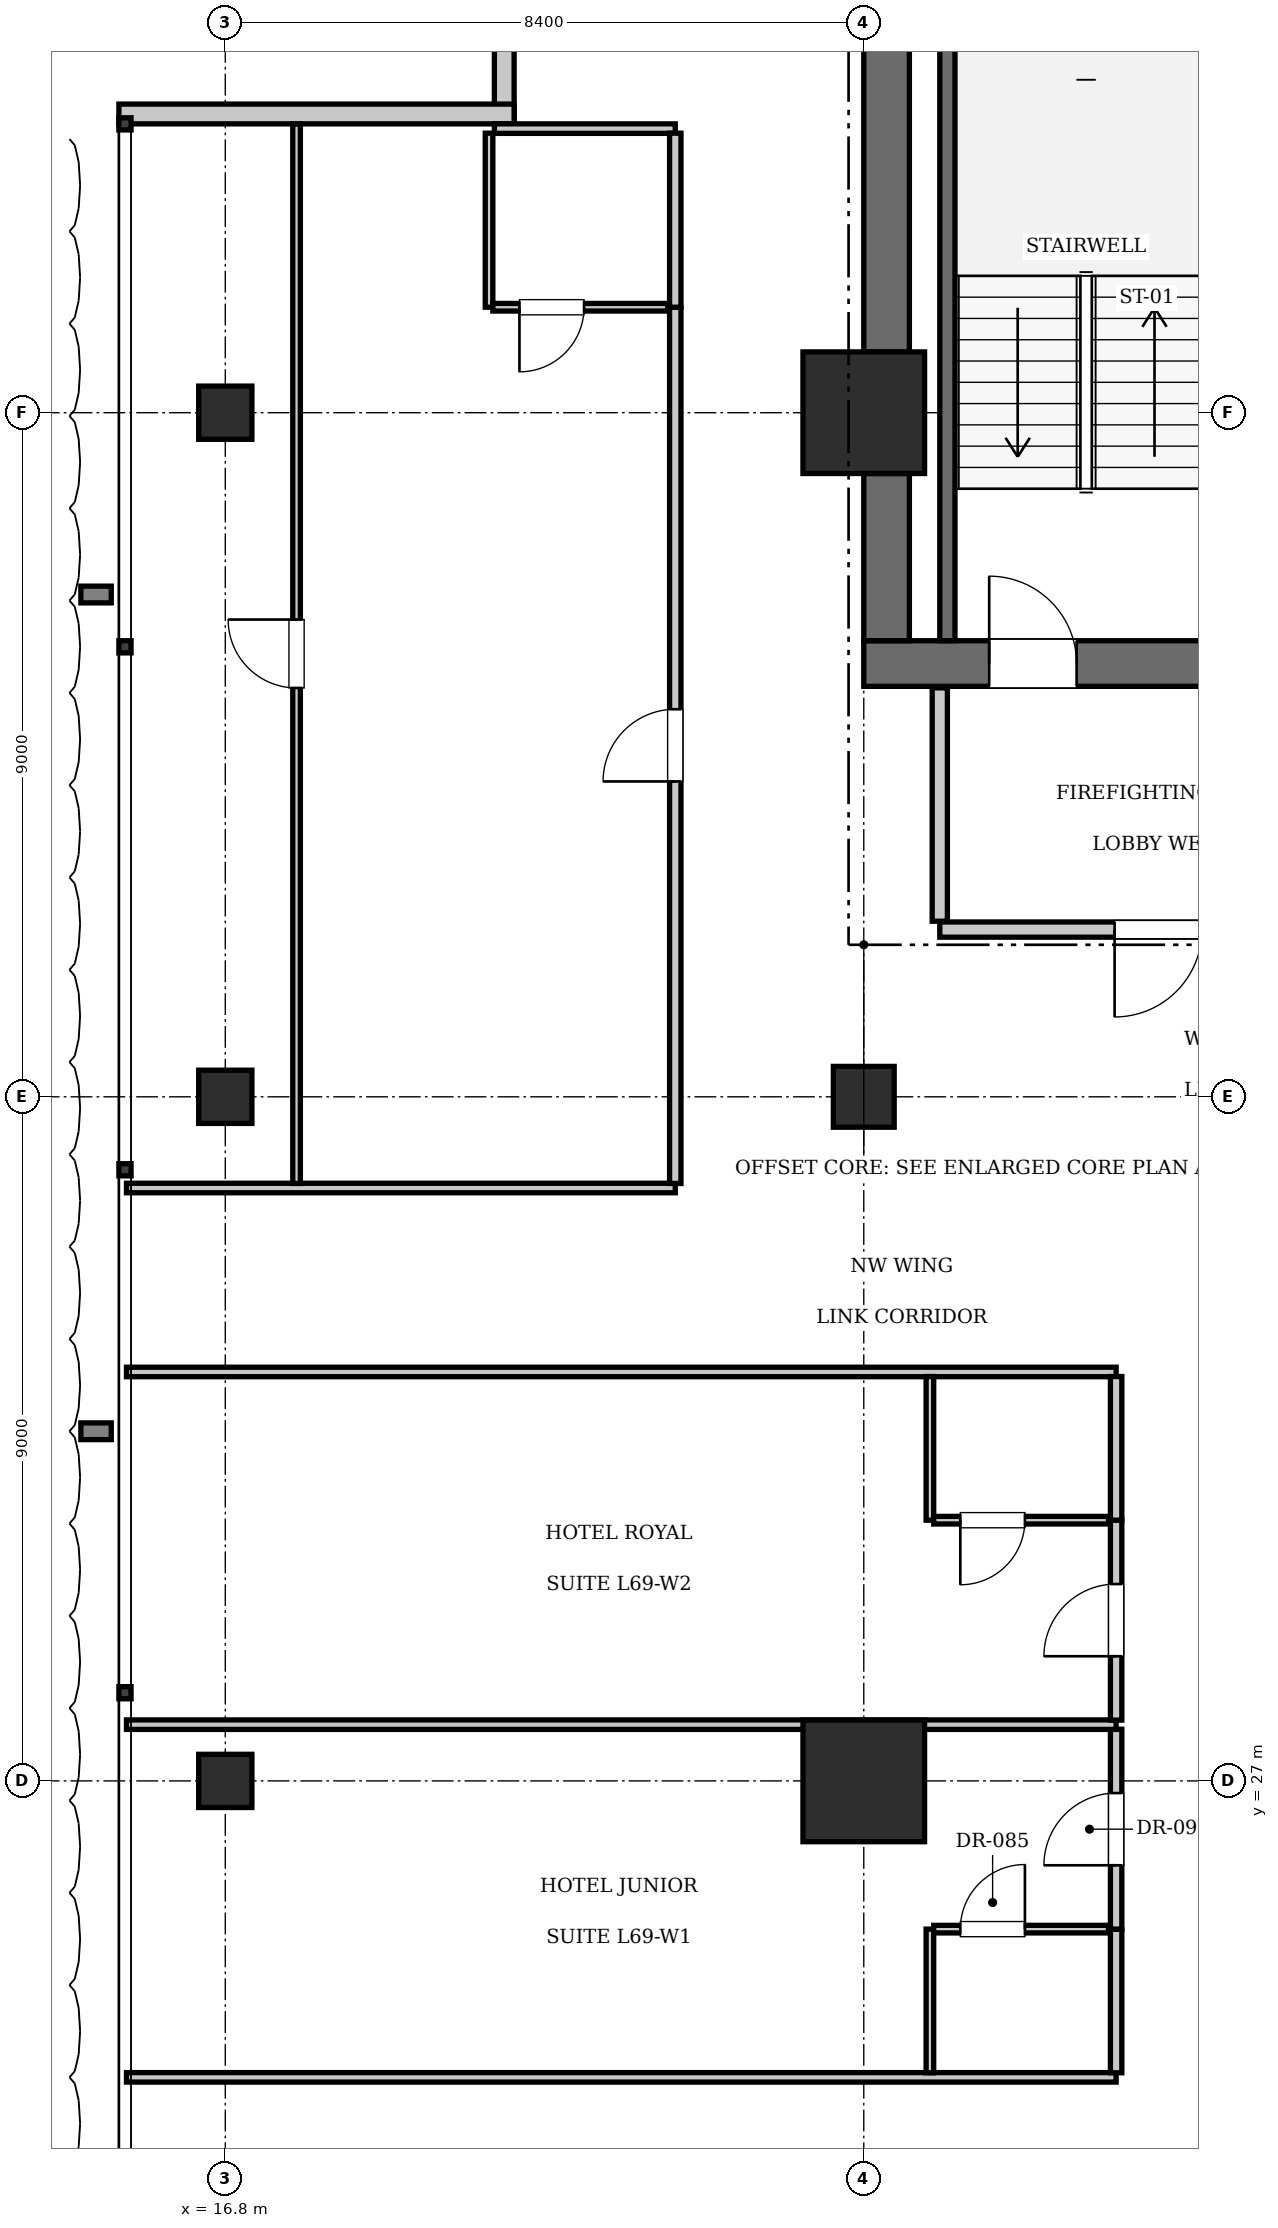
"""IFC4 building model, lengths in metres.
Left out: names, types, materials, properties, quantities, classifications, styles, units other than length and angle.
Written with IfcOpenShell. Run it as: python <this file> out.ifc"""

import sys

from ifc_helpers import new_model, si_unit, direction, frame, frame_2d, origin, origin_2d, place, context, subcontext, project, spatial, rectangle, extrude, element, fill, save


model = new_model("IFC4")
c1 = context("Model", 3, precision=1e-05, world=origin(), true_north=direction((0.0, 1.0)))
c2 = subcontext(c1, "Body", "Model", "MODEL_VIEW")
j1 = project(units=[si_unit("LENGTHUNIT", "METRE"), si_unit("PLANEANGLEUNIT", "RADIAN")], contexts=[c1])
p1 = place(None, origin())
s1 = spatial("IfcSite", under=j1, at=p1, CompositionType="ELEMENT")
p2 = place(p1, origin())
s2 = spatial("IfcBuilding", under=s1, at=p2, CompositionType="ELEMENT")
p3 = place(p2, frame((0.0, 0.0, 281.75)))
s3 = spatial("IfcBuildingStorey", under=s2, at=p3, CompositionType="ELEMENT", Elevation=281.75)
for number, where, z_axis, x_axis in (
    (1, (25.2, 27.0, 0.0), (0.0, 0.0, 1.0), (1.0, 0.0, 0.0)),
    (2, (25.2, 45.0, 0.0), (0.0, 0.0, 1.0), (1.0, 0.0, 0.0)),
):
    element("IfcColumn", number, at=place(p3, frame(where, z_axis=z_axis, x_axis=x_axis)), inside=s3, PredefinedType="COLUMN", context=c2, shape_type="SweptSolid", body=[
        extrude(rectangle(XDim=1.6, YDim=1.6, at=origin_2d()), origin(), (0.0, 0.0, 1.0), 3.85),
    ])
p4 = place(p3, frame((25.2, 41.7, 0.0), z_axis=(0.0, 0.0, 1.0), x_axis=(1.0, 0.0, 0.0)))
e3 = element("IfcWall", 3, at=p4, inside=s3, PredefinedType="SHEAR", context=c2, shape_type="SweptSolid", body=[
    extrude(rectangle(XDim=6.8, YDim=0.6, at=frame_2d((3.4, 0.0))), origin(), (0.0, 0.0, 1.0), 3.85),
])
p5 = place(p4, frame((1.65, 0.0, 0.0)))
e4 = element("IfcOpeningElement", 4, at=p5, cuts=e3, PredefinedType="OPENING", context=c2, shape_type="SweptSolid", body=[
    extrude(rectangle(XDim=1.15, YDim=2.15, at=frame_2d((0.575, 1.075))), frame((0.0, 0.31, 0.0), z_axis=(0.0, -1.0, 0.0), x_axis=(1.0, 0.0, 0.0)), (0.0, 0.0, 1.0), 0.62),
])
p6 = place(p4, frame((5.15, 0.0, 0.0)))
e5 = element("IfcOpeningElement", 5, at=p6, cuts=e3, PredefinedType="OPENING", context=c2, shape_type="SweptSolid", body=[
    extrude(rectangle(XDim=1.1, YDim=2.2, at=frame_2d((0.55, 1.1))), frame((0.0, 0.31, 0.0), z_axis=(0.0, -1.0, 0.0), x_axis=(1.0, 0.0, 0.0)), (0.0, 0.0, 1.0), 0.62),
])
p7 = place(p3, frame((25.5, 42.0, 0.0), z_axis=(0.0, 0.0, 1.0), x_axis=(0.0, 1.0, 0.0)))
e6 = element("IfcWall", 6, at=p7, inside=s3, PredefinedType="SHEAR", context=c2, shape_type="SweptSolid", body=[
    extrude(rectangle(XDim=2.2, YDim=0.6, at=frame_2d((1.1, 0.0))), origin(), (0.0, 0.0, 1.0), 3.85),
])
p8 = place(p3, frame((25.5, 45.8, 0.0), z_axis=(0.0, 0.0, 1.0), x_axis=(0.0, 1.0, 0.0)))
e7 = element("IfcWall", 7, at=p8, inside=s3, PredefinedType="SHEAR", context=c2, shape_type="SweptSolid", body=[
    extrude(rectangle(XDim=7.6, YDim=0.6, at=frame_2d((3.8, 0.0))), origin(), (0.0, 0.0, 1.0), 3.85),
])
p9 = place(p3, frame((25.2, 36.0, 0.0), z_axis=(0.0, 0.0, 1.0), x_axis=(1.0, 0.0, 0.0)))
e8 = element("IfcColumn", 8, at=p9, inside=s3, PredefinedType="COLUMN", context=c2, shape_type="SweptSolid", body=[
    extrude(rectangle(XDim=0.8, YDim=0.8, at=origin_2d()), origin(), (0.0, 0.0, 1.0), 3.85),
])
for number, where, z_axis, x_axis in (
    (9, (16.8, 27.0, 0.0), (0.0, 0.0, 1.0), (1.0, 0.0, 0.0)),
    (10, (16.8, 36.0, 0.0), (0.0, 0.0, 1.0), (1.0, 0.0, 0.0)),
    (11, (16.8, 45.0, 0.0), (0.0, 0.0, 1.0), (1.0, 0.0, 0.0)),
):
    element("IfcColumn", number, at=place(p3, frame(where, z_axis=z_axis, x_axis=x_axis)), inside=s3, PredefinedType="COLUMN", context=c2, shape_type="SweptSolid", body=[
        extrude(rectangle(XDim=0.7, YDim=0.7, at=origin_2d()), origin(), (0.0, 0.0, 1.0), 3.85),
    ])
p10 = place(p3, frame((26.3, 42.0, 0.0), z_axis=(0.0, 0.0, 1.0), x_axis=(0.0, 1.0, 0.0)))
e12 = element("IfcWall", 12, at=p10, inside=s3, PredefinedType="SOLIDWALL", context=c2, shape_type="SweptSolid", body=[
    extrude(rectangle(XDim=9.12, YDim=0.2, at=frame_2d((4.56, 0.0))), origin(), (0.0, 0.0, 1.0), 3.61),
])
p11 = place(p3, frame((20.47, 48.8, 0.0), z_axis=(0.0, 0.0, 1.0), x_axis=(0.0, 1.0, 0.0)))
e13 = element("IfcWall", 13, at=p11, inside=s3, PredefinedType="SOLIDWALL", context=c2, shape_type="SweptSolid", body=[
    extrude(rectangle(XDim=5.2, YDim=0.26, at=frame_2d((2.6, 0.0))), origin(), (0.0, 0.0, 1.0), 3.61),
])
p12 = place(p3, frame((15.4, 48.93, 0.0), z_axis=(0.0, 0.0, 1.0), x_axis=(1.0, 0.0, 0.0)))
e14 = element("IfcWall", 14, at=p12, inside=s3, PredefinedType="SOLIDWALL", context=c2, shape_type="SweptSolid", body=[
    extrude(rectangle(XDim=5.2, YDim=0.26, at=frame_2d((2.6, 0.0))), origin(), (0.0, 0.0, 1.0), 3.61),
])
p13 = place(p3, frame((26.2, 38.2, 0.0), z_axis=(0.0, 0.0, 1.0), x_axis=(1.0, 0.0, 0.0)))
e15 = element("IfcWall", 15, at=p13, inside=s3, PredefinedType="PARTITIONING", context=c2, shape_type="SweptSolid", body=[
    extrude(rectangle(XDim=5.8, YDim=0.2, at=frame_2d((2.9, 0.0))), origin(), (0.0, 0.0, 1.0), 3.61),
])
p14 = place(p13, frame((2.3, 0.0, 0.0)))
e16 = element("IfcOpeningElement", 16, at=p14, cuts=e15, PredefinedType="OPENING", context=c2, shape_type="SweptSolid", body=[
    extrude(rectangle(XDim=1.15, YDim=2.15, at=frame_2d((0.575, 1.075))), frame((0.0, 0.11, 0.0), z_axis=(0.0, -1.0, 0.0), x_axis=(1.0, 0.0, 0.0)), (0.0, 0.0, 1.0), 0.22),
])
p15 = place(p3, frame((26.2, 38.31, 0.0), z_axis=(0.0, 0.0, 1.0), x_axis=(0.0, 1.0, 0.0)))
e17 = element("IfcWall", 17, at=p15, inside=s3, PredefinedType="PARTITIONING", context=c2, shape_type="SweptSolid", body=[
    extrude(rectangle(XDim=3.07, YDim=0.2, at=frame_2d((1.535, 0.0))), origin(), (0.0, 0.0, 1.0), 3.61),
])
for number, where, z_axis, x_axis in (
    (18, (15.5, 23.1, 0.0), (0.0, 0.0, 1.0), (1.0, 0.0, 0.0)),
    (19, (15.5, 32.38, 0.0), (0.0, 0.0, 1.0), (1.0, 0.0, 0.0)),
):
    element("IfcWall", number, at=place(p3, frame(where, z_axis=z_axis, x_axis=x_axis)), inside=s3, PredefinedType="PARTITIONING", context=c2, shape_type="SweptSolid", body=[
        extrude(rectangle(XDim=13.02, YDim=0.125, at=frame_2d((6.51, 0.0))), origin(), (0.0, 0.0, 1.0), 3.61),
    ])
p16 = place(p3, frame((28.52, 23.16, 0.0), z_axis=(0.0, 0.0, 1.0), x_axis=(0.0, 1.0, 0.0)))
e20 = element("IfcWall", 20, at=p16, inside=s3, PredefinedType="PARTITIONING", context=c2, shape_type="SweptSolid", body=[
    extrude(rectangle(XDim=1.89, YDim=0.15, at=frame_2d((0.945, 0.0))), origin(), (0.0, 0.0, 1.0), 3.61),
])
p17 = place(p3, frame((28.52, 25.05, 0.0), z_axis=(0.0, 0.0, 1.0), x_axis=(0.0, 1.0, 0.0)))
e21 = element("IfcWall", 21, at=p17, inside=s3, PredefinedType="PARTITIONING", context=c2, shape_type="SweptSolid", body=[
    extrude(rectangle(XDim=2.63, YDim=0.15, at=frame_2d((1.315, 0.0))), origin(), (0.0, 0.0, 1.0), 3.61),
])
p18 = place(p17, frame((0.84, 0.0, 0.0)))
e22 = element("IfcOpeningElement", 22, at=p18, cuts=e21, PredefinedType="OPENING", context=c2, shape_type="SweptSolid", body=[
    extrude(rectangle(XDim=0.95, YDim=2.15, at=frame_2d((0.475, 1.075))), frame((0.0, 0.085, 0.0), z_axis=(0.0, -1.0, 0.0), x_axis=(1.0, 0.0, 0.0)), (0.0, 0.0, 1.0), 0.17),
])
p19 = place(p3, frame((26.07, 23.16, 0.0), z_axis=(0.0, 0.0, 1.0), x_axis=(0.0, 1.0, 0.0)))
e23 = element("IfcWall", 23, at=p19, inside=s3, PredefinedType="PARTITIONING", context=c2, shape_type="SweptSolid", body=[
    extrude(rectangle(XDim=1.89, YDim=0.1, at=frame_2d((0.945, 0.0))), origin(), (0.0, 0.0, 1.0), 3.61),
])
p20 = place(p3, frame((26.12, 25.05, 0.0), z_axis=(0.0, 0.0, 1.0), x_axis=(1.0, 0.0, 0.0)))
e24 = element("IfcWall", 24, at=p20, inside=s3, PredefinedType="PARTITIONING", context=c2, shape_type="SweptSolid", body=[
    extrude(rectangle(XDim=2.3, YDim=0.1, at=frame_2d((1.15, 0.0))), origin(), (0.0, 0.0, 1.0), 3.61),
])
p21 = place(p20, frame((0.35, 0.0, 0.0)))
e25 = element("IfcOpeningElement", 25, at=p21, cuts=e24, PredefinedType="OPENING", context=c2, shape_type="SweptSolid", body=[
    extrude(rectangle(XDim=0.85, YDim=2.1, at=frame_2d((0.425, 1.05))), frame((0.0, 0.06, 0.0), z_axis=(0.0, -1.0, 0.0), x_axis=(1.0, 0.0, 0.0)), (0.0, 0.0, 1.0), 0.12),
])
p22 = place(p3, frame((15.5, 27.74, 0.0), z_axis=(0.0, 0.0, 1.0), x_axis=(1.0, 0.0, 0.0)))
e26 = element("IfcWall", 26, at=p22, inside=s3, PredefinedType="PARTITIONING", context=c2, shape_type="SweptSolid", body=[
    extrude(rectangle(XDim=13.02, YDim=0.125, at=frame_2d((6.51, 0.0))), origin(), (0.0, 0.0, 1.0), 3.61),
])
p23 = place(p3, frame((28.52, 27.8, 0.0), z_axis=(0.0, 0.0, 1.0), x_axis=(0.0, 1.0, 0.0)))
e27 = element("IfcWall", 27, at=p23, inside=s3, PredefinedType="PARTITIONING", context=c2, shape_type="SweptSolid", body=[
    extrude(rectangle(XDim=2.63, YDim=0.15, at=frame_2d((1.315, 0.0))), origin(), (0.0, 0.0, 1.0), 3.61),
])
p24 = place(p23, frame((0.84, 0.0, 0.0)))
e28 = element("IfcOpeningElement", 28, at=p24, cuts=e27, PredefinedType="OPENING", context=c2, shape_type="SweptSolid", body=[
    extrude(rectangle(XDim=0.95, YDim=2.15, at=frame_2d((0.475, 1.075))), frame((0.0, 0.085, 0.0), z_axis=(0.0, -1.0, 0.0), x_axis=(1.0, 0.0, 0.0)), (0.0, 0.0, 1.0), 0.17),
])
p25 = place(p3, frame((28.52, 30.43, 0.0), z_axis=(0.0, 0.0, 1.0), x_axis=(0.0, 1.0, 0.0)))
e29 = element("IfcWall", 29, at=p25, inside=s3, PredefinedType="PARTITIONING", context=c2, shape_type="SweptSolid", body=[
    extrude(rectangle(XDim=1.89, YDim=0.15, at=frame_2d((0.945, 0.0))), origin(), (0.0, 0.0, 1.0), 3.61),
])
p26 = place(p3, frame((26.07, 30.43, 0.0), z_axis=(0.0, 0.0, 1.0), x_axis=(0.0, 1.0, 0.0)))
e30 = element("IfcWall", 30, at=p26, inside=s3, PredefinedType="PARTITIONING", context=c2, shape_type="SweptSolid", body=[
    extrude(rectangle(XDim=1.89, YDim=0.1, at=frame_2d((0.945, 0.0))), origin(), (0.0, 0.0, 1.0), 3.61),
])
p27 = place(p3, frame((26.12, 30.43, 0.0), z_axis=(0.0, 0.0, 1.0), x_axis=(1.0, 0.0, 0.0)))
e31 = element("IfcWall", 31, at=p27, inside=s3, PredefinedType="PARTITIONING", context=c2, shape_type="SweptSolid", body=[
    extrude(rectangle(XDim=2.3, YDim=0.1, at=frame_2d((1.15, 0.0))), origin(), (0.0, 0.0, 1.0), 3.61),
])
p28 = place(p27, frame((0.35, 0.0, 0.0)))
e32 = element("IfcOpeningElement", 32, at=p28, cuts=e31, PredefinedType="OPENING", context=c2, shape_type="SweptSolid", body=[
    extrude(rectangle(XDim=0.85, YDim=2.1, at=frame_2d((0.425, 1.05))), frame((0.0, 0.06, 0.0), z_axis=(0.0, -1.0, 0.0), x_axis=(1.0, 0.0, 0.0)), (0.0, 0.0, 1.0), 0.12),
])
p29 = place(p3, frame((15.5, 34.8, 0.0), z_axis=(0.0, 0.0, 1.0), x_axis=(1.0, 0.0, 0.0)))
e33 = element("IfcWall", 33, at=p29, inside=s3, PredefinedType="PARTITIONING", context=c2, shape_type="SweptSolid", body=[
    extrude(rectangle(XDim=7.22, YDim=0.125, at=frame_2d((3.61, 0.0))), origin(), (0.0, 0.0, 1.0), 3.61),
])
p30 = place(p3, frame((20.34, 48.738, 0.0), z_axis=(0.0, 0.0, 1.0), x_axis=(1.0, 0.0, 0.0)))
e34 = element("IfcWall", 34, at=p30, inside=s3, PredefinedType="PARTITIONING", context=c2, shape_type="SweptSolid", body=[
    extrude(rectangle(XDim=2.38, YDim=0.125, at=frame_2d((1.19, 0.0))), origin(), (0.0, 0.0, 1.0), 3.61),
])
p31 = place(p3, frame((22.72, 34.86, 0.0), z_axis=(0.0, 0.0, 1.0), x_axis=(0.0, 1.0, 0.0)))
e35 = element("IfcWall", 35, at=p31, inside=s3, PredefinedType="PARTITIONING", context=c2, shape_type="SweptSolid", body=[
    extrude(rectangle(XDim=11.527, YDim=0.15, at=frame_2d((5.764, 0.0))), origin(), (0.0, 0.0, 1.0), 3.61),
])
p32 = place(p31, frame((5.289, 0.0, 0.0)))
e36 = element("IfcOpeningElement", 36, at=p32, cuts=e35, PredefinedType="OPENING", context=c2, shape_type="SweptSolid", body=[
    extrude(rectangle(XDim=0.95, YDim=2.15, at=frame_2d((0.475, 1.075))), frame((0.0, 0.085, 0.0), z_axis=(0.0, -1.0, 0.0), x_axis=(1.0, 0.0, 0.0)), (0.0, 0.0, 1.0), 0.17),
])
p33 = place(p3, frame((22.72, 46.387, 0.0), z_axis=(0.0, 0.0, 1.0), x_axis=(0.0, 1.0, 0.0)))
e37 = element("IfcWall", 37, at=p33, inside=s3, PredefinedType="PARTITIONING", context=c2, shape_type="SweptSolid", body=[
    extrude(rectangle(XDim=2.29, YDim=0.15, at=frame_2d((1.145, 0.0))), origin(), (0.0, 0.0, 1.0), 3.61),
])
p34 = place(p3, frame((20.27, 46.387, 0.0), z_axis=(0.0, 0.0, 1.0), x_axis=(0.0, 1.0, 0.0)))
e38 = element("IfcWall", 38, at=p34, inside=s3, PredefinedType="PARTITIONING", context=c2, shape_type="SweptSolid", body=[
    extrude(rectangle(XDim=2.29, YDim=0.1, at=frame_2d((1.145, 0.0))), origin(), (0.0, 0.0, 1.0), 3.61),
])
p35 = place(p3, frame((20.32, 46.387, 0.0), z_axis=(0.0, 0.0, 1.0), x_axis=(1.0, 0.0, 0.0)))
e39 = element("IfcWall", 39, at=p35, inside=s3, PredefinedType="PARTITIONING", context=c2, shape_type="SweptSolid", body=[
    extrude(rectangle(XDim=2.3, YDim=0.1, at=frame_2d((1.15, 0.0))), origin(), (0.0, 0.0, 1.0), 3.61),
])
p36 = place(p35, frame((0.35, 0.0, 0.0)))
e40 = element("IfcOpeningElement", 40, at=p36, cuts=e39, PredefinedType="OPENING", context=c2, shape_type="SweptSolid", body=[
    extrude(rectangle(XDim=0.85, YDim=2.1, at=frame_2d((0.425, 1.05))), frame((0.0, 0.06, 0.0), z_axis=(0.0, -1.0, 0.0), x_axis=(1.0, 0.0, 0.0)), (0.0, 0.0, 1.0), 0.12),
])
p37 = place(p3, frame((17.738, 34.86, 0.0), z_axis=(0.0, 0.0, 1.0), x_axis=(0.0, 1.0, 0.0)))
e41 = element("IfcWall", 41, at=p37, inside=s3, PredefinedType="PARTITIONING", context=c2, shape_type="SweptSolid", body=[
    extrude(rectangle(XDim=13.938, YDim=0.1, at=frame_2d((6.969, 0.0))), origin(), (0.0, 0.0, 1.0), 3.61),
])
p38 = place(p37, frame((6.519, 0.0, 0.0)))
e42 = element("IfcOpeningElement", 42, at=p38, cuts=e41, PredefinedType="OPENING", context=c2, shape_type="SweptSolid", body=[
    extrude(rectangle(XDim=0.9, YDim=2.1, at=frame_2d((0.45, 1.05))), frame((0.0, 0.06, 0.0), z_axis=(0.0, -1.0, 0.0), x_axis=(1.0, 0.0, 0.0)), (0.0, 0.0, 1.0), 0.12),
])
p39 = place(p5, origin())
e43 = element("IfcDoor", 43, at=p39, inside=s3, OperationType="SINGLE_SWING_LEFT", PredefinedType="DOOR", context=c2, shape_type="SweptSolid", body=[
    extrude(rectangle(XDim=1.15, YDim=2.15, at=frame_2d((0.575, 1.075))), frame((0.0, 0.025, 0.0), z_axis=(0.0, -1.0, 0.0), x_axis=(1.0, 0.0, 0.0)), (0.0, 0.0, 1.0), 0.05),
])
fill(e4, e43)
p40 = place(p14, frame((1.15, 0.0, 0.0), z_axis=(0.0, 0.0, 1.0), x_axis=(-1.0, 0.0, 0.0)))
e44 = element("IfcDoor", 44, at=p40, inside=s3, OperationType="SINGLE_SWING_RIGHT", PredefinedType="DOOR", context=c2, shape_type="SweptSolid", body=[
    extrude(rectangle(XDim=1.15, YDim=2.15, at=frame_2d((0.575, 1.075))), frame((0.0, 0.025, 0.0), z_axis=(0.0, -1.0, 0.0), x_axis=(1.0, 0.0, 0.0)), (0.0, 0.0, 1.0), 0.05),
])
fill(e16, e44)
p41 = place(p21, origin())
e45 = element("IfcDoor", 45, at=p41, inside=s3, OperationType="SINGLE_SWING_RIGHT", PredefinedType="DOOR", context=c2, shape_type="SweptSolid", body=[
    extrude(rectangle(XDim=0.85, YDim=2.1, at=frame_2d((0.425, 1.05))), frame((0.0, 0.025, 0.0), z_axis=(0.0, -1.0, 0.0), x_axis=(1.0, 0.0, 0.0)), (0.0, 0.0, 1.0), 0.05),
])
fill(e25, e45)
p42 = place(p18, origin())
e46 = element("IfcDoor", 46, at=p42, inside=s3, OperationType="SINGLE_SWING_LEFT", PredefinedType="DOOR", context=c2, shape_type="SweptSolid", body=[
    extrude(rectangle(XDim=0.95, YDim=2.15, at=frame_2d((0.475, 1.075))), frame((0.0, 0.025, 0.0), z_axis=(0.0, -1.0, 0.0), x_axis=(1.0, 0.0, 0.0)), (0.0, 0.0, 1.0), 0.05),
])
fill(e22, e46)
p43 = place(p28, frame((0.85, 0.0, 0.0), z_axis=(0.0, 0.0, 1.0), x_axis=(-1.0, 0.0, 0.0)))
e47 = element("IfcDoor", 47, at=p43, inside=s3, OperationType="SINGLE_SWING_RIGHT", PredefinedType="DOOR", context=c2, shape_type="SweptSolid", body=[
    extrude(rectangle(XDim=0.85, YDim=2.1, at=frame_2d((0.425, 1.05))), frame((0.0, 0.025, 0.0), z_axis=(0.0, -1.0, 0.0), x_axis=(1.0, 0.0, 0.0)), (0.0, 0.0, 1.0), 0.05),
])
fill(e32, e47)
p44 = place(p24, origin())
e48 = element("IfcDoor", 48, at=p44, inside=s3, OperationType="SINGLE_SWING_LEFT", PredefinedType="DOOR", context=c2, shape_type="SweptSolid", body=[
    extrude(rectangle(XDim=0.95, YDim=2.15, at=frame_2d((0.475, 1.075))), frame((0.0, 0.025, 0.0), z_axis=(0.0, -1.0, 0.0), x_axis=(1.0, 0.0, 0.0)), (0.0, 0.0, 1.0), 0.05),
])
fill(e28, e48)
p45 = place(p36, frame((0.85, 0.0, 0.0), z_axis=(0.0, 0.0, 1.0), x_axis=(-1.0, 0.0, 0.0)))
e49 = element("IfcDoor", 49, at=p45, inside=s3, OperationType="SINGLE_SWING_RIGHT", PredefinedType="DOOR", context=c2, shape_type="SweptSolid", body=[
    extrude(rectangle(XDim=0.85, YDim=2.1, at=frame_2d((0.425, 1.05))), frame((0.0, 0.025, 0.0), z_axis=(0.0, -1.0, 0.0), x_axis=(1.0, 0.0, 0.0)), (0.0, 0.0, 1.0), 0.05),
])
fill(e40, e49)
p46 = place(p32, origin())
e50 = element("IfcDoor", 50, at=p46, inside=s3, OperationType="SINGLE_SWING_LEFT", PredefinedType="DOOR", context=c2, shape_type="SweptSolid", body=[
    extrude(rectangle(XDim=0.95, YDim=2.15, at=frame_2d((0.475, 1.075))), frame((0.0, 0.025, 0.0), z_axis=(0.0, -1.0, 0.0), x_axis=(1.0, 0.0, 0.0)), (0.0, 0.0, 1.0), 0.05),
])
fill(e36, e50)
p47 = place(p38, origin())
e51 = element("IfcDoor", 51, at=p47, inside=s3, OperationType="SINGLE_SWING_RIGHT", PredefinedType="DOOR", context=c2, shape_type="SweptSolid", body=[
    extrude(rectangle(XDim=0.9, YDim=2.1, at=frame_2d((0.45, 1.05))), frame((0.0, 0.025, 0.0), z_axis=(0.0, -1.0, 0.0), x_axis=(1.0, 0.0, 0.0)), (0.0, 0.0, 1.0), 0.05),
])
fill(e42, e51)
save(model, sys.argv[1])
